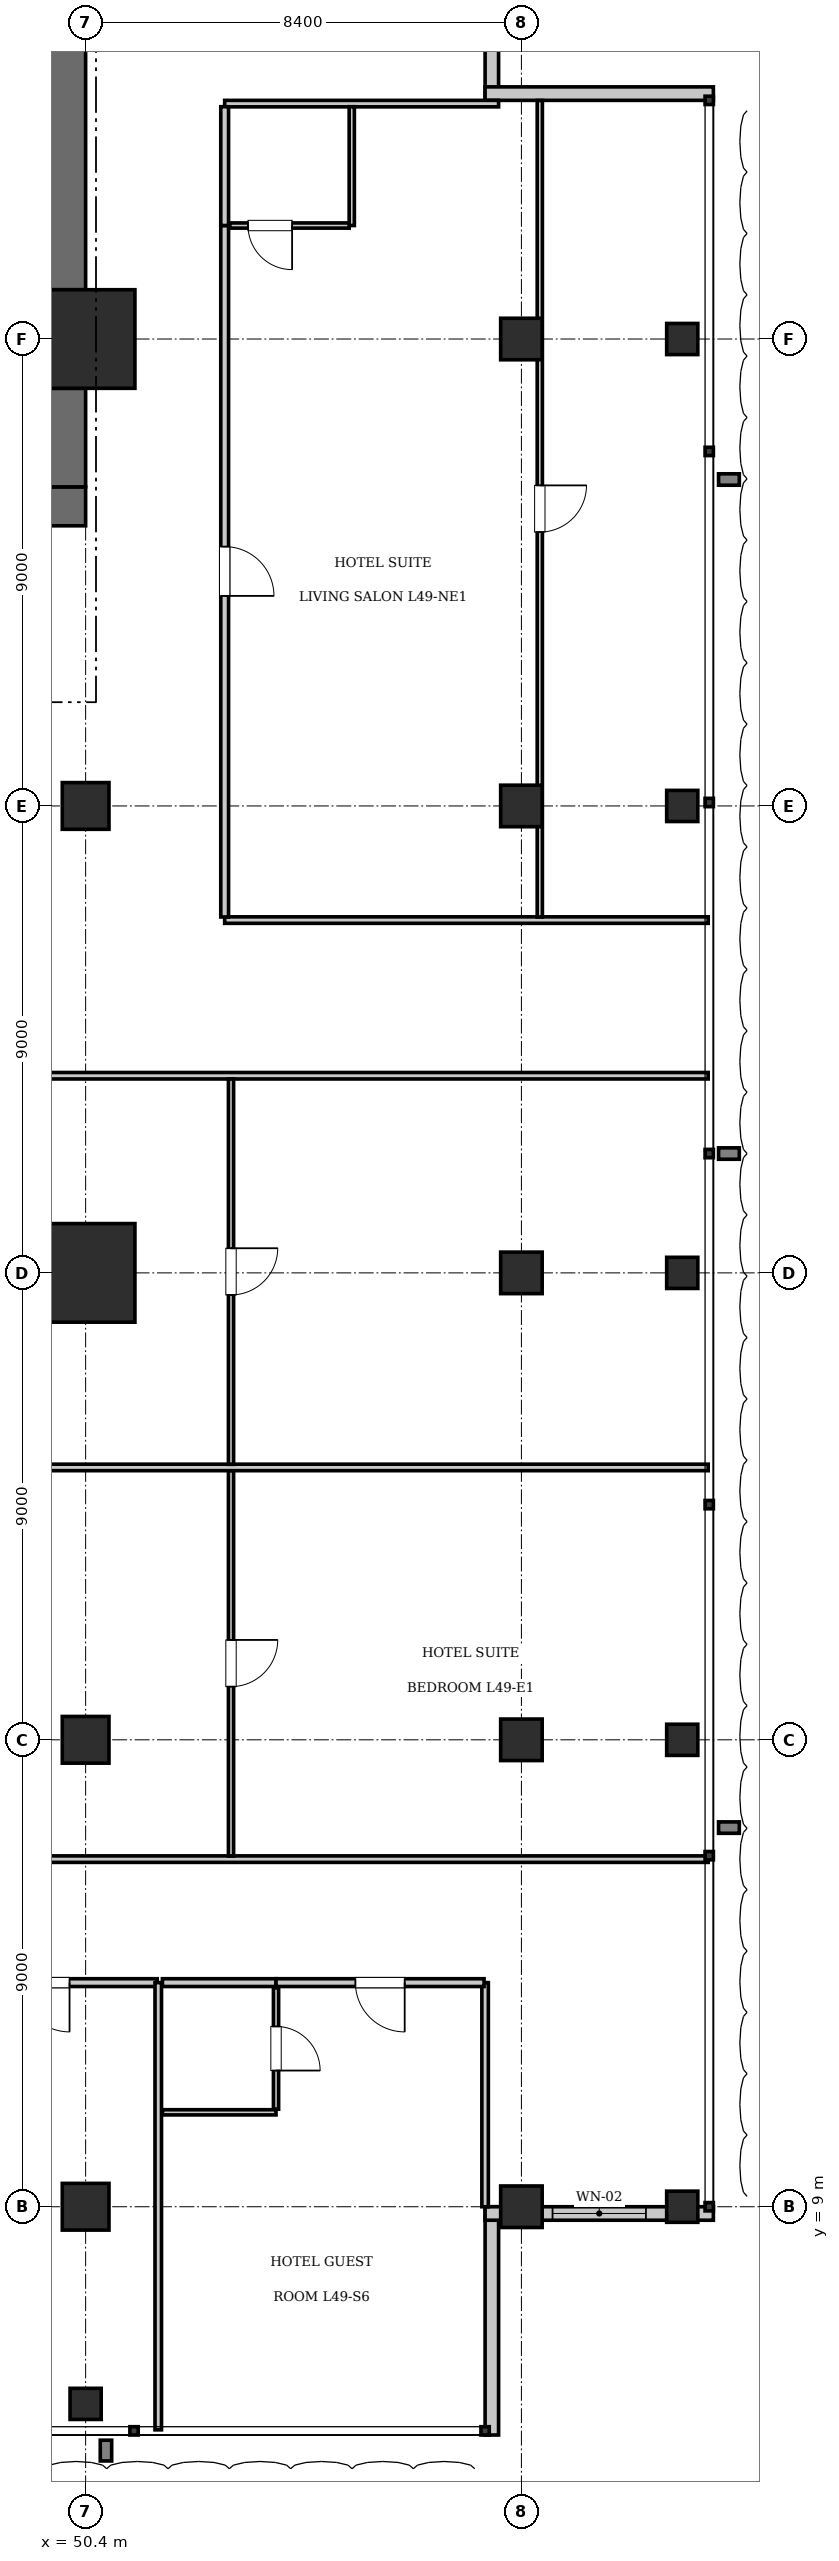
"""IFC4 building model, lengths in metres.
Left out: names, types, materials, properties, quantities, classifications, styles, units other than length and angle.
Written with IfcOpenShell. Run it as: python <this file> out.ifc"""

import sys

from ifc_helpers import new_model, si_unit, direction, frame, frame_2d, origin, origin_2d, place, context, subcontext, project, spatial, rectangle, i_section, extrude, element, fill, save


model = new_model("IFC4")
c1 = context("Model", 3, precision=1e-05, world=origin(), true_north=direction((0.0, 1.0)))
c2 = subcontext(c1, "Body", "Model", "MODEL_VIEW")
j1 = project(units=[si_unit("LENGTHUNIT", "METRE"), si_unit("PLANEANGLEUNIT", "RADIAN")], contexts=[c1])
p1 = place(None, origin())
s1 = spatial("IfcSite", under=j1, at=p1, CompositionType="ELEMENT")
p2 = place(p1, origin())
s2 = spatial("IfcBuilding", under=s1, at=p2, CompositionType="ELEMENT")
p3 = place(p2, frame((0.0, 0.0, 200.55)))
s3 = spatial("IfcBuildingStorey", under=s2, at=p3, CompositionType="ELEMENT", Elevation=200.55)
for number, where, z_axis, x_axis in (
    (1, (50.4, 27.0, 0.0), (0.0, 0.0, 1.0), (1.0, 0.0, 0.0)),
    (2, (50.4, 45.0, 0.0), (0.0, 0.0, 1.0), (1.0, 0.0, 0.0)),
):
    element("IfcColumn", number, at=place(p3, frame(where, z_axis=z_axis, x_axis=x_axis)), inside=s3, PredefinedType="COLUMN", context=c2, shape_type="SweptSolid", body=[
        extrude(rectangle(XDim=1.9, YDim=1.9, at=origin_2d()), origin(), (0.0, 0.0, 1.0), 3.85),
    ])
p4 = place(p3, frame((43.6, 41.775, 0.0), z_axis=(0.0, 0.0, 1.0), x_axis=(1.0, 0.0, 0.0)))
e3 = element("IfcWall", 3, at=p4, inside=s3, PredefinedType="SHEAR", context=c2, shape_type="SweptSolid", body=[
    extrude(rectangle(XDim=6.8, YDim=0.75, at=frame_2d((3.4, 0.0))), origin(), (0.0, 0.0, 1.0), 3.85),
])
p5 = place(p4, frame((3.9, 0.0, 0.0)))
e4 = element("IfcOpeningElement", 4, at=p5, cuts=e3, PredefinedType="OPENING", context=c2, shape_type="SweptSolid", body=[
    extrude(rectangle(XDim=1.15, YDim=2.15, at=frame_2d((0.575, 1.075))), frame((0.0, 0.385, 0.0), z_axis=(0.0, -1.0, 0.0), x_axis=(1.0, 0.0, 0.0)), (0.0, 0.0, 1.0), 0.77),
])
p6 = place(p4, frame((0.55, 0.0, 0.0)))
e5 = element("IfcOpeningElement", 5, at=p6, cuts=e3, PredefinedType="OPENING", context=c2, shape_type="SweptSolid", body=[
    extrude(rectangle(XDim=1.1, YDim=2.2, at=frame_2d((0.55, 1.1))), frame((0.0, 0.385, 0.0), z_axis=(0.0, -1.0, 0.0), x_axis=(1.0, 0.0, 0.0)), (0.0, 0.0, 1.0), 0.77),
])
p7 = place(p3, frame((50.025, 42.15, 0.0), z_axis=(0.0, 0.0, 1.0), x_axis=(0.0, 1.0, 0.0)))
e6 = element("IfcWall", 6, at=p7, inside=s3, PredefinedType="SHEAR", context=c2, shape_type="SweptSolid", body=[
    extrude(rectangle(XDim=1.9, YDim=0.75, at=frame_2d((0.95, 0.0))), origin(), (0.0, 0.0, 1.0), 3.85),
])
p8 = place(p3, frame((50.025, 45.95, 0.0), z_axis=(0.0, 0.0, 1.0), x_axis=(0.0, 1.0, 0.0)))
e7 = element("IfcWall", 7, at=p8, inside=s3, PredefinedType="SHEAR", context=c2, shape_type="SweptSolid", body=[
    extrude(rectangle(XDim=7.3, YDim=0.75, at=frame_2d((3.65, 0.0))), origin(), (0.0, 0.0, 1.0), 3.85),
])
for number, where, z_axis, x_axis in (
    (8, (50.4, 36.0, 0.0), (0.0, 0.0, 1.0), (1.0, 0.0, 0.0)),
    (9, (50.4, 18.0, 0.0), (0.0, 0.0, 1.0), (1.0, 0.0, 0.0)),
    (10, (50.4, 9.0, 0.0), (0.0, 0.0, 1.0), (1.0, 0.0, 0.0)),
):
    element("IfcColumn", number, at=place(p3, frame(where, z_axis=z_axis, x_axis=x_axis)), inside=s3, PredefinedType="COLUMN", context=c2, shape_type="SweptSolid", body=[
        extrude(rectangle(XDim=0.9, YDim=0.9, at=origin_2d()), origin(), (0.0, 0.0, 1.0), 3.85),
    ])
for number, where, z_axis, x_axis in (
    (11, (58.8, 9.0, 0.0), (0.0, 0.0, 1.0), (1.0, 0.0, 0.0)),
    (12, (58.8, 18.0, 0.0), (0.0, 0.0, 1.0), (1.0, 0.0, 0.0)),
    (13, (58.8, 27.0, 0.0), (0.0, 0.0, 1.0), (1.0, 0.0, 0.0)),
    (14, (58.8, 36.0, 0.0), (0.0, 0.0, 1.0), (1.0, 0.0, 0.0)),
    (15, (58.8, 45.0, 0.0), (0.0, 0.0, 1.0), (1.0, 0.0, 0.0)),
):
    element("IfcColumn", number, at=place(p3, frame(where, z_axis=z_axis, x_axis=x_axis)), inside=s3, PredefinedType="COLUMN", context=c2, shape_type="SweptSolid", body=[
        extrude(rectangle(XDim=0.8, YDim=0.8, at=origin_2d()), origin(), (0.0, 0.0, 1.0), 3.85),
    ])
for number, where, z_axis, x_axis in (
    (16, (61.9, 9.0, 0.0), (0.0, 0.0, 1.0), (1.0, 0.0, 0.0)),
    (17, (61.9, 18.0, 0.0), (0.0, 0.0, 1.0), (1.0, 0.0, 0.0)),
    (18, (61.9, 27.0, 0.0), (0.0, 0.0, 1.0), (1.0, 0.0, 0.0)),
    (19, (61.9, 36.0, 0.0), (0.0, 0.0, 1.0), (1.0, 0.0, 0.0)),
    (20, (61.9, 45.0, 0.0), (0.0, 0.0, 1.0), (1.0, 0.0, 0.0)),
    (21, (50.4, 5.2, 0.0), (0.0, 0.0, 1.0), (1.0, 0.0, 0.0)),
):
    element("IfcColumn", number, at=place(p3, frame(where, z_axis=z_axis, x_axis=x_axis)), inside=s3, PredefinedType="COLUMN", context=c2, shape_type="SweptSolid", body=[
        extrude(i_section(OverallWidth=0.6, OverallDepth=0.6, WebThickness=0.025, FlangeThickness=0.038, at=origin_2d()), origin(), (0.0, 0.0, 1.0), 3.85),
    ])
p9 = place(p3, frame((58.23, 9.0, 0.0), z_axis=(0.0, 0.0, 1.0), x_axis=(0.0, -1.0, 0.0)))
e22 = element("IfcWall", 22, at=p9, inside=s3, PredefinedType="SOLIDWALL", context=c2, shape_type="SweptSolid", body=[
    extrude(rectangle(XDim=4.4, YDim=0.26, at=frame_2d((2.2, 0.0))), origin(), (0.0, 0.0, 1.0), 3.61),
])
p10 = place(p3, frame((62.5, 8.87, 0.0), z_axis=(0.0, 0.0, 1.0), x_axis=(-1.0, 0.0, 0.0)))
e23 = element("IfcWall", 23, at=p10, inside=s3, PredefinedType="SOLIDWALL", context=c2, shape_type="SweptSolid", body=[
    extrude(rectangle(XDim=4.4, YDim=0.26, at=frame_2d((2.2, 0.0))), origin(), (0.0, 0.0, 1.0), 3.071),
])
p11 = place(p10, frame((1.3, 0.0, 0.9)))
e24 = element("IfcOpeningElement", 24, at=p11, cuts=e23, PredefinedType="OPENING", context=c2, shape_type="SweptSolid", body=[
    extrude(rectangle(XDim=1.8, YDim=2.1, at=frame_2d((0.9, 1.05))), frame((0.0, 0.14, 0.0), z_axis=(0.0, -1.0, 0.0), x_axis=(1.0, 0.0, 0.0)), (0.0, 0.0, 1.0), 0.28),
])
for number, where, z_axis, x_axis in (
    (25, (58.23, 54.0, 0.0), (0.0, 0.0, 1.0), (0.0, -1.0, 0.0)),
    (26, (58.1, 49.73, 0.0), (0.0, 0.0, 1.0), (1.0, 0.0, 0.0)),
):
    element("IfcWall", number, at=place(p3, frame(where, z_axis=z_axis, x_axis=x_axis)), inside=s3, PredefinedType="SOLIDWALL", context=c2, shape_type="SweptSolid", body=[
        extrude(rectangle(XDim=4.4, YDim=0.26, at=frame_2d((2.2, 0.0))), origin(), (0.0, 0.0, 1.0), 3.61),
    ])
p12 = place(p3, frame((58.1, 9.0, 0.0), z_axis=(0.0, 0.0, 1.0), x_axis=(0.0, 1.0, 0.0)))
e27 = element("IfcWall", 27, at=p12, inside=s3, PredefinedType="PARTITIONING", context=c2, shape_type="SweptSolid", body=[
    extrude(rectangle(XDim=4.32, YDim=0.125, at=frame_2d((2.16, 0.0))), origin(), (0.0, 0.0, 1.0), 3.61),
])
p13 = place(p3, frame((47.45, 13.32, 0.0), z_axis=(0.0, 0.0, 1.0), x_axis=(1.0, 0.0, 0.0)))
e28 = element("IfcWall", 28, at=p13, inside=s3, PredefinedType="PARTITIONING", context=c2, shape_type="SweptSolid", body=[
    extrude(rectangle(XDim=4.33, YDim=0.15, at=frame_2d((2.165, 0.0))), origin(), (0.0, 0.0, 1.0), 3.61),
])
p14 = place(p13, frame((1.69, 0.0, 0.0)))
e29 = element("IfcOpeningElement", 29, at=p14, cuts=e28, PredefinedType="OPENING", context=c2, shape_type="SweptSolid", body=[
    extrude(rectangle(XDim=0.95, YDim=2.15, at=frame_2d((0.475, 1.075))), frame((0.0, 0.085, 0.0), z_axis=(0.0, -1.0, 0.0), x_axis=(1.0, 0.0, 0.0)), (0.0, 0.0, 1.0), 0.17),
])
p15 = place(p3, frame((51.8, 4.7, 0.0), z_axis=(0.0, 0.0, 1.0), x_axis=(0.0, 1.0, 0.0)))
e30 = element("IfcWall", 30, at=p15, inside=s3, PredefinedType="PARTITIONING", context=c2, shape_type="SweptSolid", body=[
    extrude(rectangle(XDim=8.62, YDim=0.125, at=frame_2d((4.31, 0.0))), origin(), (0.0, 0.0, 1.0), 3.61),
])
p16 = place(p3, frame((51.88, 13.32, 0.0), z_axis=(0.0, 0.0, 1.0), x_axis=(1.0, 0.0, 0.0)))
e31 = element("IfcWall", 31, at=p16, inside=s3, PredefinedType="PARTITIONING", context=c2, shape_type="SweptSolid", body=[
    extrude(rectangle(XDim=2.19, YDim=0.15, at=frame_2d((1.095, 0.0))), origin(), (0.0, 0.0, 1.0), 3.61),
])
p17 = place(p3, frame((51.88, 10.82, 0.0), z_axis=(0.0, 0.0, 1.0), x_axis=(1.0, 0.0, 0.0)))
e32 = element("IfcWall", 32, at=p17, inside=s3, PredefinedType="PARTITIONING", context=c2, shape_type="SweptSolid", body=[
    extrude(rectangle(XDim=2.19, YDim=0.1, at=frame_2d((1.095, 0.0))), origin(), (0.0, 0.0, 1.0), 3.61),
])
p18 = place(p3, frame((54.07, 10.88, 0.0), z_axis=(0.0, 0.0, 1.0), x_axis=(0.0, 1.0, 0.0)))
e33 = element("IfcWall", 33, at=p18, inside=s3, PredefinedType="PARTITIONING", context=c2, shape_type="SweptSolid", body=[
    extrude(rectangle(XDim=2.34, YDim=0.1, at=frame_2d((1.17, 0.0))), origin(), (0.0, 0.0, 1.0), 3.61),
])
p19 = place(p18, frame((0.745, 0.0, 0.0)))
e34 = element("IfcOpeningElement", 34, at=p19, cuts=e33, PredefinedType="OPENING", context=c2, shape_type="SweptSolid", body=[
    extrude(rectangle(XDim=0.85, YDim=2.1, at=frame_2d((0.425, 1.05))), frame((0.0, 0.06, 0.0), z_axis=(0.0, -1.0, 0.0), x_axis=(1.0, 0.0, 0.0)), (0.0, 0.0, 1.0), 0.12),
])
p20 = place(p3, frame((54.07, 13.32, 0.0), z_axis=(0.0, 0.0, 1.0), x_axis=(1.0, 0.0, 0.0)))
e35 = element("IfcWall", 35, at=p20, inside=s3, PredefinedType="PARTITIONING", context=c2, shape_type="SweptSolid", body=[
    extrude(rectangle(XDim=4.01, YDim=0.15, at=frame_2d((2.005, 0.0))), origin(), (0.0, 0.0, 1.0), 3.61),
])
p21 = place(p20, frame((1.53, 0.0, 0.0)))
e36 = element("IfcOpeningElement", 36, at=p21, cuts=e35, PredefinedType="OPENING", context=c2, shape_type="SweptSolid", body=[
    extrude(rectangle(XDim=0.95, YDim=2.15, at=frame_2d((0.475, 1.075))), frame((0.0, 0.085, 0.0), z_axis=(0.0, -1.0, 0.0), x_axis=(1.0, 0.0, 0.0)), (0.0, 0.0, 1.0), 0.17),
])
for number, where, z_axis, x_axis in (
    (37, (40.68, 15.7, 0.0), (0.0, 0.0, 1.0), (1.0, 0.0, 0.0)),
    (38, (40.68, 30.8, 0.0), (0.0, 0.0, 1.0), (1.0, 0.0, 0.0)),
):
    element("IfcWall", number, at=place(p3, frame(where, z_axis=z_axis, x_axis=x_axis)), inside=s3, PredefinedType="PARTITIONING", context=c2, shape_type="SweptSolid", body=[
        extrude(rectangle(XDim=21.72, YDim=0.125, at=frame_2d((10.86, 0.0))), origin(), (0.0, 0.0, 1.0), 3.61),
    ])
p22 = place(p3, frame((53.202, 15.76, 0.0), z_axis=(0.0, 0.0, 1.0), x_axis=(0.0, 1.0, 0.0)))
e39 = element("IfcWall", 39, at=p22, inside=s3, PredefinedType="PARTITIONING", context=c2, shape_type="SweptSolid", body=[
    extrude(rectangle(XDim=7.43, YDim=0.1, at=frame_2d((3.715, 0.0))), origin(), (0.0, 0.0, 1.0), 3.61),
])
p23 = place(p22, frame((3.265, 0.0, 0.0)))
e40 = element("IfcOpeningElement", 40, at=p23, cuts=e39, PredefinedType="OPENING", context=c2, shape_type="SweptSolid", body=[
    extrude(rectangle(XDim=0.9, YDim=2.1, at=frame_2d((0.45, 1.05))), frame((0.0, 0.06, 0.0), z_axis=(0.0, -1.0, 0.0), x_axis=(1.0, 0.0, 0.0)), (0.0, 0.0, 1.0), 0.12),
])
p24 = place(p3, frame((40.68, 23.25, 0.0), z_axis=(0.0, 0.0, 1.0), x_axis=(1.0, 0.0, 0.0)))
e41 = element("IfcWall", 41, at=p24, inside=s3, PredefinedType="PARTITIONING", context=c2, shape_type="SweptSolid", body=[
    extrude(rectangle(XDim=21.72, YDim=0.125, at=frame_2d((10.86, 0.0))), origin(), (0.0, 0.0, 1.0), 3.61),
])
p25 = place(p3, frame((53.202, 23.31, 0.0), z_axis=(0.0, 0.0, 1.0), x_axis=(0.0, 1.0, 0.0)))
e42 = element("IfcWall", 42, at=p25, inside=s3, PredefinedType="PARTITIONING", context=c2, shape_type="SweptSolid", body=[
    extrude(rectangle(XDim=7.43, YDim=0.1, at=frame_2d((3.715, 0.0))), origin(), (0.0, 0.0, 1.0), 3.61),
])
p26 = place(p25, frame((3.265, 0.0, 0.0)))
e43 = element("IfcOpeningElement", 43, at=p26, cuts=e42, PredefinedType="OPENING", context=c2, shape_type="SweptSolid", body=[
    extrude(rectangle(XDim=0.9, YDim=2.1, at=frame_2d((0.45, 1.05))), frame((0.0, 0.06, 0.0), z_axis=(0.0, -1.0, 0.0), x_axis=(1.0, 0.0, 0.0)), (0.0, 0.0, 1.0), 0.12),
])
p27 = place(p3, frame((53.08, 33.8, 0.0), z_axis=(0.0, 0.0, 1.0), x_axis=(1.0, 0.0, 0.0)))
e44 = element("IfcWall", 44, at=p27, inside=s3, PredefinedType="PARTITIONING", context=c2, shape_type="SweptSolid", body=[
    extrude(rectangle(XDim=9.32, YDim=0.125, at=frame_2d((4.66, 0.0))), origin(), (0.0, 0.0, 1.0), 3.61),
])
p28 = place(p3, frame((53.08, 49.538, 0.0), z_axis=(0.0, 0.0, 1.0), x_axis=(1.0, 0.0, 0.0)))
e45 = element("IfcWall", 45, at=p28, inside=s3, PredefinedType="PARTITIONING", context=c2, shape_type="SweptSolid", body=[
    extrude(rectangle(XDim=5.28, YDim=0.125, at=frame_2d((2.64, 0.0))), origin(), (0.0, 0.0, 1.0), 3.61),
])
p29 = place(p3, frame((53.08, 33.86, 0.0), z_axis=(0.0, 0.0, 1.0), x_axis=(0.0, 1.0, 0.0)))
e46 = element("IfcWall", 46, at=p29, inside=s3, PredefinedType="PARTITIONING", context=c2, shape_type="SweptSolid", body=[
    extrude(rectangle(XDim=13.327, YDim=0.15, at=frame_2d((6.664, 0.0))), origin(), (0.0, 0.0, 1.0), 3.61),
])
p30 = place(p29, frame((6.189, 0.0, 0.0)))
e47 = element("IfcOpeningElement", 47, at=p30, cuts=e46, PredefinedType="OPENING", context=c2, shape_type="SweptSolid", body=[
    extrude(rectangle(XDim=0.95, YDim=2.15, at=frame_2d((0.475, 1.075))), frame((0.0, 0.085, 0.0), z_axis=(0.0, -1.0, 0.0), x_axis=(1.0, 0.0, 0.0)), (0.0, 0.0, 1.0), 0.17),
])
p31 = place(p3, frame((53.08, 47.188, 0.0), z_axis=(0.0, 0.0, 1.0), x_axis=(0.0, 1.0, 0.0)))
e48 = element("IfcWall", 48, at=p31, inside=s3, PredefinedType="PARTITIONING", context=c2, shape_type="SweptSolid", body=[
    extrude(rectangle(XDim=2.29, YDim=0.15, at=frame_2d((1.145, 0.0))), origin(), (0.0, 0.0, 1.0), 3.61),
])
p32 = place(p3, frame((55.53, 47.188, 0.0), z_axis=(0.0, 0.0, 1.0), x_axis=(0.0, 1.0, 0.0)))
e49 = element("IfcWall", 49, at=p32, inside=s3, PredefinedType="PARTITIONING", context=c2, shape_type="SweptSolid", body=[
    extrude(rectangle(XDim=2.29, YDim=0.1, at=frame_2d((1.145, 0.0))), origin(), (0.0, 0.0, 1.0), 3.61),
])
p33 = place(p3, frame((53.18, 47.188, 0.0), z_axis=(0.0, 0.0, 1.0), x_axis=(1.0, 0.0, 0.0)))
e50 = element("IfcWall", 50, at=p33, inside=s3, PredefinedType="PARTITIONING", context=c2, shape_type="SweptSolid", body=[
    extrude(rectangle(XDim=2.3, YDim=0.1, at=frame_2d((1.15, 0.0))), origin(), (0.0, 0.0, 1.0), 3.61),
])
p34 = place(p33, frame((0.35, 0.0, 0.0)))
e51 = element("IfcOpeningElement", 51, at=p34, cuts=e50, PredefinedType="OPENING", context=c2, shape_type="SweptSolid", body=[
    extrude(rectangle(XDim=0.85, YDim=2.1, at=frame_2d((0.425, 1.05))), frame((0.0, 0.06, 0.0), z_axis=(0.0, -1.0, 0.0), x_axis=(1.0, 0.0, 0.0)), (0.0, 0.0, 1.0), 0.12),
])
p35 = place(p3, frame((59.154, 33.86, 0.0), z_axis=(0.0, 0.0, 1.0), x_axis=(0.0, 1.0, 0.0)))
e52 = element("IfcWall", 52, at=p35, inside=s3, PredefinedType="PARTITIONING", context=c2, shape_type="SweptSolid", body=[
    extrude(rectangle(XDim=15.737, YDim=0.1, at=frame_2d((7.869, 0.0))), origin(), (0.0, 0.0, 1.0), 3.61),
])
p36 = place(p35, frame((7.419, 0.0, 0.0)))
e53 = element("IfcOpeningElement", 53, at=p36, cuts=e52, PredefinedType="OPENING", context=c2, shape_type="SweptSolid", body=[
    extrude(rectangle(XDim=0.9, YDim=2.1, at=frame_2d((0.45, 1.05))), frame((0.0, 0.06, 0.0), z_axis=(0.0, -1.0, 0.0), x_axis=(1.0, 0.0, 0.0)), (0.0, 0.0, 1.0), 0.12),
])
p37 = place(p11, origin())
e54 = element("IfcWindow", 54, at=p37, inside=s3, PartitioningType="SINGLE_PANEL", PredefinedType="WINDOW", context=c2, shape_type="SweptSolid", body=[
    extrude(rectangle(XDim=1.8, YDim=2.1, at=frame_2d((0.9, 1.05))), frame((0.0, 0.03, 0.0), z_axis=(0.0, -1.0, 0.0), x_axis=(1.0, 0.0, 0.0)), (0.0, 0.0, 1.0), 0.06),
])
fill(e24, e54)
p38 = place(p14, frame((0.95, 0.0, 0.0), z_axis=(0.0, 0.0, 1.0), x_axis=(-1.0, 0.0, 0.0)))
e55 = element("IfcDoor", 55, at=p38, inside=s3, OperationType="SINGLE_SWING_LEFT", PredefinedType="DOOR", context=c2, shape_type="SweptSolid", body=[
    extrude(rectangle(XDim=0.95, YDim=2.15, at=frame_2d((0.475, 1.075))), frame((0.0, 0.025, 0.0), z_axis=(0.0, -1.0, 0.0), x_axis=(1.0, 0.0, 0.0)), (0.0, 0.0, 1.0), 0.05),
])
fill(e29, e55)
p39 = place(p19, frame((0.85, 0.0, 0.0), z_axis=(0.0, 0.0, 1.0), x_axis=(-1.0, 0.0, 0.0)))
e56 = element("IfcDoor", 56, at=p39, inside=s3, OperationType="SINGLE_SWING_RIGHT", PredefinedType="DOOR", context=c2, shape_type="SweptSolid", body=[
    extrude(rectangle(XDim=0.85, YDim=2.1, at=frame_2d((0.425, 1.05))), frame((0.0, 0.025, 0.0), z_axis=(0.0, -1.0, 0.0), x_axis=(1.0, 0.0, 0.0)), (0.0, 0.0, 1.0), 0.05),
])
fill(e34, e56)
p40 = place(p21, frame((0.95, 0.0, 0.0), z_axis=(0.0, 0.0, 1.0), x_axis=(-1.0, 0.0, 0.0)))
e57 = element("IfcDoor", 57, at=p40, inside=s3, OperationType="SINGLE_SWING_LEFT", PredefinedType="DOOR", context=c2, shape_type="SweptSolid", body=[
    extrude(rectangle(XDim=0.95, YDim=2.15, at=frame_2d((0.475, 1.075))), frame((0.0, 0.025, 0.0), z_axis=(0.0, -1.0, 0.0), x_axis=(1.0, 0.0, 0.0)), (0.0, 0.0, 1.0), 0.05),
])
fill(e36, e57)
p41 = place(p23, frame((0.9, 0.0, 0.0), z_axis=(0.0, 0.0, 1.0), x_axis=(-1.0, 0.0, 0.0)))
e58 = element("IfcDoor", 58, at=p41, inside=s3, OperationType="SINGLE_SWING_LEFT", PredefinedType="DOOR", context=c2, shape_type="SweptSolid", body=[
    extrude(rectangle(XDim=0.9, YDim=2.1, at=frame_2d((0.45, 1.05))), frame((0.0, 0.025, 0.0), z_axis=(0.0, -1.0, 0.0), x_axis=(1.0, 0.0, 0.0)), (0.0, 0.0, 1.0), 0.05),
])
fill(e40, e58)
p42 = place(p26, frame((0.9, 0.0, 0.0), z_axis=(0.0, 0.0, 1.0), x_axis=(-1.0, 0.0, 0.0)))
e59 = element("IfcDoor", 59, at=p42, inside=s3, OperationType="SINGLE_SWING_LEFT", PredefinedType="DOOR", context=c2, shape_type="SweptSolid", body=[
    extrude(rectangle(XDim=0.9, YDim=2.1, at=frame_2d((0.45, 1.05))), frame((0.0, 0.025, 0.0), z_axis=(0.0, -1.0, 0.0), x_axis=(1.0, 0.0, 0.0)), (0.0, 0.0, 1.0), 0.05),
])
fill(e43, e59)
p43 = place(p34, frame((0.85, 0.0, 0.0), z_axis=(0.0, 0.0, 1.0), x_axis=(-1.0, 0.0, 0.0)))
e60 = element("IfcDoor", 60, at=p43, inside=s3, OperationType="SINGLE_SWING_LEFT", PredefinedType="DOOR", context=c2, shape_type="SweptSolid", body=[
    extrude(rectangle(XDim=0.85, YDim=2.1, at=frame_2d((0.425, 1.05))), frame((0.0, 0.025, 0.0), z_axis=(0.0, -1.0, 0.0), x_axis=(1.0, 0.0, 0.0)), (0.0, 0.0, 1.0), 0.05),
])
fill(e51, e60)
p44 = place(p30, frame((0.95, 0.0, 0.0), z_axis=(0.0, 0.0, 1.0), x_axis=(-1.0, 0.0, 0.0)))
e61 = element("IfcDoor", 61, at=p44, inside=s3, OperationType="SINGLE_SWING_RIGHT", PredefinedType="DOOR", context=c2, shape_type="SweptSolid", body=[
    extrude(rectangle(XDim=0.95, YDim=2.15, at=frame_2d((0.475, 1.075))), frame((0.0, 0.025, 0.0), z_axis=(0.0, -1.0, 0.0), x_axis=(1.0, 0.0, 0.0)), (0.0, 0.0, 1.0), 0.05),
])
fill(e47, e61)
p45 = place(p36, frame((0.9, 0.0, 0.0), z_axis=(0.0, 0.0, 1.0), x_axis=(-1.0, 0.0, 0.0)))
e62 = element("IfcDoor", 62, at=p45, inside=s3, OperationType="SINGLE_SWING_LEFT", PredefinedType="DOOR", context=c2, shape_type="SweptSolid", body=[
    extrude(rectangle(XDim=0.9, YDim=2.1, at=frame_2d((0.45, 1.05))), frame((0.0, 0.025, 0.0), z_axis=(0.0, -1.0, 0.0), x_axis=(1.0, 0.0, 0.0)), (0.0, 0.0, 1.0), 0.05),
])
fill(e53, e62)
save(model, sys.argv[1])
